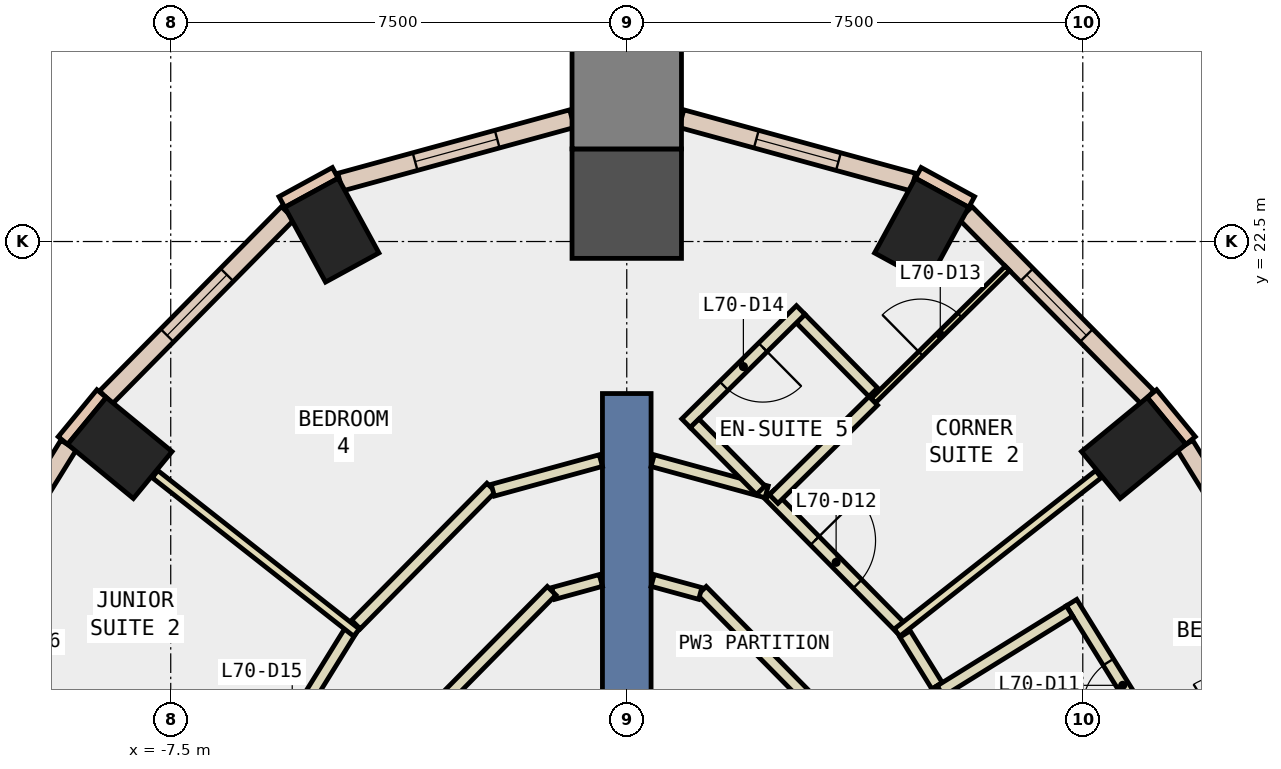
"""IFC4 building model, lengths in metres.
Left out: names, types, materials, properties, quantities, classifications, styles, units other than length and angle.
Written with IfcOpenShell. Run it as: python <this file> out.ifc"""

import sys

from ifc_helpers import new_model, si_unit, direction, frame, frame_2d, origin, origin_2d, place, context, subcontext, project, spatial, rectangle, extrude, element, fill, save


model = new_model("IFC4")
c1 = context("Model", 3, precision=1e-05, world=origin(), true_north=direction((0.0, 1.0)))
c2 = subcontext(c1, "Body", "Model", "MODEL_VIEW")
j1 = project(units=[si_unit("LENGTHUNIT", "METRE"), si_unit("PLANEANGLEUNIT", "RADIAN")], contexts=[c1])
p1 = place(None, origin())
s1 = spatial("IfcSite", under=j1, at=p1, CompositionType="ELEMENT")
p2 = place(p1, origin())
s2 = spatial("IfcBuilding", under=s1, at=p2, CompositionType="ELEMENT")
p3 = place(p2, frame((0.0, 0.0, 300.8)))
s3 = spatial("IfcBuildingStorey", under=s2, at=p3, CompositionType="ELEMENT", Elevation=300.8)
for number, where, z_axis, x_axis in (
    (1, (8.337, 19.105, -0.34), (0.0, 0.0, 1.0), (-0.636, 0.772, 0.0)),
    (2, (4.85, 22.687, -0.34), (0.0, 0.0, 1.0), (-0.878, 0.479, 0.0)),
):
    element("IfcColumn", number, at=place(p3, frame(where, z_axis=z_axis, x_axis=x_axis)), inside=s3, PredefinedType="COLUMN", context=c2, shape_type="SweptSolid", body=[
        extrude(rectangle(XDim=1.0, YDim=1.4, at=origin_2d()), origin(), (0.0, 0.0, 1.0), 3.6),
    ])
p4 = place(p3, frame((0.0, 23.123, -0.34), z_axis=(0.0, 0.0, 1.0), x_axis=(0.0, 1.0, 0.0)))
e3 = element("IfcColumn", 3, at=p4, inside=s3, PredefinedType="COLUMN", context=c2, shape_type="SweptSolid", body=[
    extrude(rectangle(XDim=1.8, YDim=1.8, at=origin_2d()), origin(), (0.0, 0.0, 1.0), 3.6),
])
for number, where, z_axis, x_axis in (
    (4, (-4.85, 22.687, -0.34), (0.0, 0.0, 1.0), (0.878, 0.479, 0.0)),
    (5, (-8.337, 19.105, -0.34), (0.0, 0.0, 1.0), (0.636, 0.772, 0.0)),
):
    element("IfcColumn", number, at=place(p3, frame(where, z_axis=z_axis, x_axis=x_axis)), inside=s3, PredefinedType="COLUMN", context=c2, shape_type="SweptSolid", body=[
        extrude(rectangle(XDim=1.0, YDim=1.4, at=origin_2d()), origin(), (0.0, 0.0, 1.0), 3.6),
    ])
p5 = place(p3, frame((0.0, 24.923, -0.34), z_axis=(0.0, 0.0, 1.0), x_axis=(0.0, 1.0, 0.0)))
e6 = element("IfcColumn", 6, at=p5, inside=s3, PredefinedType="COLUMN", context=c2, shape_type="SweptSolid", body=[
    extrude(rectangle(XDim=1.8, YDim=1.8, at=origin_2d()), origin(), (0.0, 0.0, 1.0), 3.6),
])
p6 = place(p3, frame((0.0, 11.0, -0.34), z_axis=(0.0, 0.0, 1.0), x_axis=(0.0, 1.0, 0.0)))
e7 = element("IfcWall", 7, at=p6, inside=s3, PredefinedType="SHEAR", context=c2, shape_type="SweptSolid", body=[
    extrude(rectangle(XDim=9.0, YDim=0.8, at=frame_2d((4.5, 0.0))), origin(), (0.0, 0.0, 1.0), 3.6),
])
for number, where, z_axis, x_axis in (
    (8, (5.672, 23.15, 0.0), (0.0, 0.0, 1.0), (-0.878, 0.479, 0.0)),
    (9, (-4.794, 23.629, 0.0), (0.0, 0.0, 1.0), (-0.878, -0.479, 0.0)),
    (10, (9.273, 19.227, 0.0), (0.0, 0.0, 1.0), (-0.636, 0.772, 0.0)),
    (11, (-8.637, 19.999, 0.0), (0.0, 0.0, 1.0), (-0.636, -0.772, 0.0)),
):
    element("IfcWall", number, at=place(p3, frame(where, z_axis=z_axis, x_axis=x_axis)), inside=s3, PredefinedType="STANDARD", context=c2, shape_type="SweptSolid", body=[
        extrude(rectangle(XDim=1.0, YDim=0.2, at=frame_2d((0.5, 0.0))), origin(), (0.0, 0.0, 1.0), 3.26),
    ])
p7 = place(p3, frame((13.047, 12.907, 0.0), z_axis=(0.0, 0.0, 1.0), x_axis=(-0.526409529565, 0.850231149267, 0.0)))
e12 = element("IfcWall", 12, at=p7, inside=s3, PredefinedType="STANDARD", context=c2, shape_type="SweptSolid", body=[
    extrude(rectangle(XDim=7.346, YDim=0.3, at=frame_2d((3.673, 0.0))), origin(), (0.0, 0.0, 1.0), 3.26),
])
p8 = place(p7, frame((0.737, 0.0, 0.9)))
e13 = element("IfcOpeningElement", 13, at=p8, cuts=e12, PredefinedType="OPENING", context=c2, shape_type="SweptSolid", body=[
    extrude(rectangle(XDim=2.2, YDim=2.0, at=frame_2d((1.1, 1.0))), frame((0.0, 0.16, 0.0), z_axis=(0.0, -1.0, 0.0), x_axis=(1.0, 0.0, 0.0)), (0.0, 0.0, 1.0), 0.32),
])
p9 = place(p7, frame((4.41, 0.0, 0.9)))
e14 = element("IfcOpeningElement", 14, at=p9, cuts=e12, PredefinedType="OPENING", context=c2, shape_type="SweptSolid", body=[
    extrude(rectangle(XDim=2.2, YDim=2.0, at=frame_2d((1.1, 1.0))), frame((0.0, 0.16, 0.0), z_axis=(0.0, -1.0, 0.0), x_axis=(1.0, 0.0, 0.0)), (0.0, 0.0, 1.0), 0.32),
])
p10 = place(p3, frame((8.564, 19.938, 0.0), z_axis=(0.0, 0.0, 1.0), x_axis=(-0.70250598769, 0.711677832491, 0.0)))
e15 = element("IfcWall", 15, at=p10, inside=s3, PredefinedType="STANDARD", context=c2, shape_type="SweptSolid", body=[
    extrude(rectangle(XDim=4.259, YDim=0.3, at=frame_2d((2.129, 0.0))), origin(), (0.0, 0.0, 1.0), 3.26),
])
p11 = place(p10, frame((1.429, 0.0, 0.9)))
e16 = element("IfcOpeningElement", 16, at=p11, cuts=e15, PredefinedType="OPENING", context=c2, shape_type="SweptSolid", body=[
    extrude(rectangle(XDim=1.4, YDim=2.0, at=frame_2d((0.7, 1.0))), frame((0.0, 0.16, 0.0), z_axis=(0.0, -1.0, 0.0), x_axis=(1.0, 0.0, 0.0)), (0.0, 0.0, 1.0), 0.32),
])
p12 = place(p3, frame((4.713, 23.477, 0.0), z_axis=(0.0, 0.0, 1.0), x_axis=(-0.964521196932, 0.264005417877, 0.0)))
e17 = element("IfcWall", 17, at=p12, inside=s3, PredefinedType="STANDARD", context=c2, shape_type="SweptSolid", body=[
    extrude(rectangle(XDim=3.954, YDim=0.3, at=frame_2d((1.977, 0.0))), origin(), (0.0, 0.0, 1.0), 3.26),
])
p13 = place(p12, frame((1.277, 0.0, 0.9)))
e18 = element("IfcOpeningElement", 18, at=p13, cuts=e17, PredefinedType="OPENING", context=c2, shape_type="SweptSolid", body=[
    extrude(rectangle(XDim=1.4, YDim=2.0, at=frame_2d((0.7, 1.0))), frame((0.0, 0.16, 0.0), z_axis=(0.0, -1.0, 0.0), x_axis=(1.0, 0.0, 0.0)), (0.0, 0.0, 1.0), 0.32),
])
p14 = place(p3, frame((-0.899, 24.521, 0.0), z_axis=(0.0, 0.0, 1.0), x_axis=(-0.964521196932, -0.264005417877, 0.0)))
e19 = element("IfcWall", 19, at=p14, inside=s3, PredefinedType="STANDARD", context=c2, shape_type="SweptSolid", body=[
    extrude(rectangle(XDim=3.954, YDim=0.3, at=frame_2d((1.977, 0.0))), origin(), (0.0, 0.0, 1.0), 3.26),
])
p15 = place(p14, frame((1.277, 0.0, 0.9)))
e20 = element("IfcOpeningElement", 20, at=p15, cuts=e19, PredefinedType="OPENING", context=c2, shape_type="SweptSolid", body=[
    extrude(rectangle(XDim=1.4, YDim=2.0, at=frame_2d((0.7, 1.0))), frame((0.0, 0.16, 0.0), z_axis=(0.0, -1.0, 0.0), x_axis=(1.0, 0.0, 0.0)), (0.0, 0.0, 1.0), 0.32),
])
p16 = place(p3, frame((-5.572, 22.969, 0.0), z_axis=(0.0, 0.0, 1.0), x_axis=(-0.70250598769, -0.711677832491, 0.0)))
e21 = element("IfcWall", 21, at=p16, inside=s3, PredefinedType="STANDARD", context=c2, shape_type="SweptSolid", body=[
    extrude(rectangle(XDim=4.259, YDim=0.3, at=frame_2d((2.129, 0.0))), origin(), (0.0, 0.0, 1.0), 3.26),
])
p17 = place(p16, frame((1.429, 0.0, 0.9)))
e22 = element("IfcOpeningElement", 22, at=p17, cuts=e21, PredefinedType="OPENING", context=c2, shape_type="SweptSolid", body=[
    extrude(rectangle(XDim=1.4, YDim=2.0, at=frame_2d((0.7, 1.0))), frame((0.0, 0.16, 0.0), z_axis=(0.0, -1.0, 0.0), x_axis=(1.0, 0.0, 0.0)), (0.0, 0.0, 1.0), 0.32),
])
p18 = place(p3, frame((-9.18, 19.153, 0.0), z_axis=(0.0, 0.0, 1.0), x_axis=(-0.526409529565, -0.850231149267, 0.0)))
e23 = element("IfcWall", 23, at=p18, inside=s3, PredefinedType="STANDARD", context=c2, shape_type="SweptSolid", body=[
    extrude(rectangle(XDim=7.346, YDim=0.3, at=frame_2d((3.673, 0.0))), origin(), (0.0, 0.0, 1.0), 3.26),
])
p19 = place(p18, frame((0.737, 0.0, 0.9)))
e24 = element("IfcOpeningElement", 24, at=p19, cuts=e23, PredefinedType="OPENING", context=c2, shape_type="SweptSolid", body=[
    extrude(rectangle(XDim=2.2, YDim=2.0, at=frame_2d((1.1, 1.0))), frame((0.0, 0.16, 0.0), z_axis=(0.0, -1.0, 0.0), x_axis=(1.0, 0.0, 0.0)), (0.0, 0.0, 1.0), 0.32),
])
p20 = place(p18, frame((4.41, 0.0, 0.9)))
e25 = element("IfcOpeningElement", 25, at=p20, cuts=e23, PredefinedType="OPENING", context=c2, shape_type="SweptSolid", body=[
    extrude(rectangle(XDim=2.2, YDim=2.0, at=frame_2d((1.1, 1.0))), frame((0.0, 0.16, 0.0), z_axis=(0.0, -1.0, 0.0), x_axis=(1.0, 0.0, 0.0)), (0.0, 0.0, 1.0), 0.32),
])
p21 = place(p3, frame((2.951, 15.019, 0.0), z_axis=(0.0, 0.0, 1.0), x_axis=(-0.702341227034, 0.711840432126, 0.0)))
e26 = element("IfcWall", 26, at=p21, inside=s3, PredefinedType="PARTITIONING", context=c2, shape_type="SweptSolid", body=[
    extrude(rectangle(XDim=2.442, YDim=0.2, at=frame_2d((1.221, 0.0))), origin(), (0.0, 0.0, 1.0), 3.26),
])
p22 = place(p3, frame((1.209, 16.712, 0.0), z_axis=(0.0, 0.0, 1.0), x_axis=(-0.964583129746, 0.26377904733, 0.0)))
e27 = element("IfcWall", 27, at=p22, inside=s3, PredefinedType="PARTITIONING", context=c2, shape_type="SweptSolid", body=[
    extrude(rectangle(XDim=0.812, YDim=0.2, at=frame_2d((0.406, 0.0))), origin(), (0.0, 0.0, 1.0), 3.26),
])
p23 = place(p3, frame((-0.426, 16.927, 0.0), z_axis=(0.0, 0.0, 1.0), x_axis=(-0.964276465753, -0.264897900321, 0.0)))
e28 = element("IfcWall", 28, at=p23, inside=s3, PredefinedType="PARTITIONING", context=c2, shape_type="SweptSolid", body=[
    extrude(rectangle(XDim=0.812, YDim=0.2, at=frame_2d((0.406, 0.0))), origin(), (0.0, 0.0, 1.0), 3.26),
])
p24 = place(p3, frame((-1.236, 16.757, 0.0), z_axis=(0.0, 0.0, 1.0), x_axis=(-0.702341227034, -0.711840432126, 0.0)))
e29 = element("IfcWall", 29, at=p24, inside=s3, PredefinedType="PARTITIONING", context=c2, shape_type="SweptSolid", body=[
    extrude(rectangle(XDim=2.442, YDim=0.2, at=frame_2d((1.221, 0.0))), origin(), (0.0, 0.0, 1.0), 3.26),
])
p25 = place(p3, frame((4.577, 16.045, 0.0), z_axis=(0.0, 0.0, 1.0), x_axis=(0.526203576349, -0.850358628014, 0.0)))
e30 = element("IfcWall", 30, at=p25, inside=s3, PredefinedType="PARTITIONING", context=c2, shape_type="SweptSolid", body=[
    extrude(rectangle(XDim=1.002, YDim=0.2, at=frame_2d((0.501, 0.0))), origin(), (0.0, 0.0, 1.0), 3.26),
])
p26 = place(p3, frame((5.104, 15.193, 0.0), z_axis=(0.0, 0.0, 1.0), x_axis=(0.526329401671, -0.850280754184, 0.0)))
e31 = element("IfcWall", 31, at=p26, inside=s3, PredefinedType="PARTITIONING", context=c2, shape_type="SweptSolid", body=[
    extrude(rectangle(XDim=3.0, YDim=0.2, at=frame_2d((1.5, 0.0))), origin(), (0.0, 0.0, 1.0), 3.26),
])
p27 = place(p3, frame((2.346, 18.336, 0.0), z_axis=(0.0, 0.0, 1.0), x_axis=(0.702481985573, -0.711701524479, 0.0)))
e32 = element("IfcWall", 32, at=p27, inside=s3, PredefinedType="PARTITIONING", context=c2, shape_type="SweptSolid", body=[
    extrude(rectangle(XDim=3.125, YDim=0.2, at=frame_2d((1.562, 0.0))), origin(), (0.0, 0.0, 1.0), 3.26),
])
p28 = place(p27, frame((1.062, 0.0, 0.0)))
e33 = element("IfcOpeningElement", 33, at=p28, cuts=e32, PredefinedType="OPENING", context=c2, shape_type="SweptSolid", body=[
    extrude(rectangle(XDim=1.0, YDim=2.1, at=frame_2d((0.5, 1.05))), frame((0.0, 0.11, 0.0), z_axis=(0.0, -1.0, 0.0), x_axis=(1.0, 0.0, 0.0)), (0.0, 0.0, 1.0), 0.22),
])
p29 = place(p3, frame((-4.454, 16.201, 0.0), z_axis=(0.0, 0.0, 1.0), x_axis=(0.702505657511, 0.711678158415, 0.0)))
e34 = element("IfcWall", 34, at=p29, inside=s3, PredefinedType="PARTITIONING", context=c2, shape_type="SweptSolid", body=[
    extrude(rectangle(XDim=3.167, YDim=0.2, at=frame_2d((1.584, 0.0))), origin(), (0.0, 0.0, 1.0), 3.26),
])
p30 = place(p3, frame((-2.203, 18.41, 0.0), z_axis=(0.0, 0.0, 1.0), x_axis=(0.964423583418, 0.264361781934, 0.0)))
e35 = element("IfcWall", 35, at=p30, inside=s3, PredefinedType="PARTITIONING", context=c2, shape_type="SweptSolid", body=[
    extrude(rectangle(XDim=1.842, YDim=0.2, at=frame_2d((0.921, 0.0))), origin(), (0.0, 0.0, 1.0), 3.26),
])
p31 = place(p3, frame((0.426, 18.896, 0.0), z_axis=(0.0, 0.0, 1.0), x_axis=(0.964522741234, -0.263999775838, 0.0)))
e36 = element("IfcWall", 36, at=p31, inside=s3, PredefinedType="PARTITIONING", context=c2, shape_type="SweptSolid", body=[
    extrude(rectangle(XDim=1.943, YDim=0.2, at=frame_2d((0.971, 0.0))), origin(), (0.0, 0.0, 1.0), 3.26),
])
p32 = place(p3, frame((-6.493, 12.95, 0.0), z_axis=(0.0, 0.0, 1.0), x_axis=(0.526432748426, 0.850216773173, 0.0)))
e37 = element("IfcWall", 37, at=p32, inside=s3, PredefinedType="PARTITIONING", context=c2, shape_type="SweptSolid", body=[
    extrude(rectangle(XDim=3.765, YDim=0.2, at=frame_2d((1.882, 0.0))), origin(), (0.0, 0.0, 1.0), 3.26),
])
p33 = place(p32, frame((1.383, 0.0, 0.0)))
e38 = element("IfcOpeningElement", 38, at=p33, cuts=e37, PredefinedType="OPENING", context=c2, shape_type="SweptSolid", body=[
    extrude(rectangle(XDim=1.0, YDim=2.1, at=frame_2d((0.5, 1.05))), frame((0.0, 0.11, 0.0), z_axis=(0.0, -1.0, 0.0), x_axis=(1.0, 0.0, 0.0)), (0.0, 0.0, 1.0), 0.22),
])
p34 = place(p3, frame((9.031, 13.979, 0.0), z_axis=(0.0, 0.0, 1.0), x_axis=(0.85032680557, 0.526254998768, 0.0)))
e39 = element("IfcWall", 39, at=p34, inside=s3, PredefinedType="PARTITIONING", context=c2, shape_type="SweptSolid", body=[
    extrude(rectangle(XDim=2.7, YDim=0.1, at=frame_2d((1.35, 0.0))), origin(), (0.0, 0.0, 1.0), 3.26),
])
p35 = place(p34, frame((0.9, 0.0, 0.0)))
e40 = element("IfcOpeningElement", 40, at=p35, cuts=e39, PredefinedType="OPENING", context=c2, shape_type="SweptSolid", body=[
    extrude(rectangle(XDim=0.9, YDim=2.1, at=frame_2d((0.45, 1.05))), frame((0.0, 0.06, 0.0), z_axis=(0.0, -1.0, 0.0), x_axis=(1.0, 0.0, 0.0)), (0.0, 0.0, 1.0), 0.12),
])
p36 = place(p3, frame((8.999, 13.841, 0.0), z_axis=(0.0, 0.0, 1.0), x_axis=(-0.526283695852, 0.850309044689, 0.0)))
e41 = element("IfcWall", 41, at=p36, inside=s3, PredefinedType="PARTITIONING", context=c2, shape_type="SweptSolid", body=[
    extrude(rectangle(XDim=3.2, YDim=0.2, at=frame_2d((1.6, 0.0))), origin(), (0.0, 0.0, 1.0), 3.26),
])
p37 = place(p36, frame((1.15, 0.0, 0.0)))
e42 = element("IfcOpeningElement", 42, at=p37, cuts=e41, PredefinedType="OPENING", context=c2, shape_type="SweptSolid", body=[
    extrude(rectangle(XDim=0.9, YDim=2.1, at=frame_2d((0.45, 1.05))), frame((0.0, 0.11, 0.0), z_axis=(0.0, -1.0, 0.0), x_axis=(1.0, 0.0, 0.0)), (0.0, 0.0, 1.0), 0.22),
])
p38 = place(p3, frame((7.282, 16.424, 0.0), z_axis=(0.0, 0.0, 1.0), x_axis=(-0.850142312258, -0.526552987751, 0.0)))
e43 = element("IfcWall", 43, at=p38, inside=s3, PredefinedType="PARTITIONING", context=c2, shape_type="SweptSolid", body=[
    extrude(rectangle(XDim=2.5, YDim=0.2, at=frame_2d((1.25, 0.0))), origin(), (0.0, 0.0, 1.0), 3.26),
])
p39 = place(p3, frame((4.445, 16.068, 0.0), z_axis=(0.0, 0.0, 1.0), x_axis=(0.785872006963, 0.618389188677, 0.0)))
e44 = element("IfcWall", 44, at=p39, inside=s3, PredefinedType="PARTITIONING", context=c2, shape_type="SweptSolid", body=[
    extrude(rectangle(XDim=4.216, YDim=0.15, at=frame_2d((2.108, 0.0))), origin(), (0.0, 0.0, 1.0), 3.26),
])
p40 = place(p3, frame((4.053, 19.881, 0.0), z_axis=(0.0, 0.0, 1.0), x_axis=(0.711776071152, 0.702406452516, 0.0)))
e45 = element("IfcWall", 45, at=p40, inside=s3, PredefinedType="PARTITIONING", context=c2, shape_type="SweptSolid", body=[
    extrude(rectangle(XDim=3.101, YDim=0.1, at=frame_2d((1.55, 0.0))), origin(), (0.0, 0.0, 1.0), 3.26),
])
p41 = place(p40, frame((1.1, 0.0, 0.0)))
e46 = element("IfcOpeningElement", 46, at=p41, cuts=e45, PredefinedType="OPENING", context=c2, shape_type="SweptSolid", body=[
    extrude(rectangle(XDim=0.9, YDim=2.1, at=frame_2d((0.45, 1.05))), frame((0.0, 0.06, 0.0), z_axis=(0.0, -1.0, 0.0), x_axis=(1.0, 0.0, 0.0)), (0.0, 0.0, 1.0), 0.12),
])
p42 = place(p3, frame((2.416, 18.265, 0.0), z_axis=(0.0, 0.0, 1.0), x_axis=(0.71207765541, 0.702100714047, 0.0)))
e47 = element("IfcWall", 47, at=p42, inside=s3, PredefinedType="PARTITIONING", context=c2, shape_type="SweptSolid", body=[
    extrude(rectangle(XDim=2.3, YDim=0.2, at=frame_2d((1.15, 0.0))), origin(), (0.0, 0.0, 1.0), 3.26),
])
p43 = place(p3, frame((4.054, 20.022, 0.0), z_axis=(0.0, 0.0, 1.0), x_axis=(-0.702351102688, 0.711830688123, 0.0)))
e48 = element("IfcWall", 48, at=p43, inside=s3, PredefinedType="PARTITIONING", context=c2, shape_type="SweptSolid", body=[
    extrude(rectangle(XDim=1.7, YDim=0.2, at=frame_2d((0.85, 0.0))), origin(), (0.0, 0.0, 1.0), 3.26),
])
p44 = place(p3, frame((2.861, 21.374, 0.0), z_axis=(0.0, 0.0, 1.0), x_axis=(-0.711606122075, -0.702578626934, 0.0)))
e49 = element("IfcWall", 49, at=p44, inside=s3, PredefinedType="PARTITIONING", context=c2, shape_type="SweptSolid", body=[
    extrude(rectangle(XDim=2.65, YDim=0.2, at=frame_2d((1.325, 0.0))), origin(), (0.0, 0.0, 1.0), 3.26),
])
p45 = place(p44, frame((0.875, 0.0, 0.0)))
e50 = element("IfcOpeningElement", 50, at=p45, cuts=e49, PredefinedType="OPENING", context=c2, shape_type="SweptSolid", body=[
    extrude(rectangle(XDim=0.9, YDim=2.1, at=frame_2d((0.45, 1.05))), frame((0.0, 0.11, 0.0), z_axis=(0.0, -1.0, 0.0), x_axis=(1.0, 0.0, 0.0)), (0.0, 0.0, 1.0), 0.22),
])
p46 = place(p3, frame((1.116, 19.511, 0.0), z_axis=(0.0, 0.0, 1.0), x_axis=(0.702515837086, -0.711668109896, 0.0)))
e51 = element("IfcWall", 51, at=p46, inside=s3, PredefinedType="PARTITIONING", context=c2, shape_type="SweptSolid", body=[
    extrude(rectangle(XDim=1.547, YDim=0.2, at=frame_2d((0.773, 0.0))), origin(), (0.0, 0.0, 1.0), 3.26),
])
p47 = place(p3, frame((-4.445, 16.068, 0.0), z_axis=(0.0, 0.0, 1.0), x_axis=(-0.785872006963, 0.618389188677, 0.0)))
e52 = element("IfcWall", 52, at=p47, inside=s3, PredefinedType="PARTITIONING", context=c2, shape_type="SweptSolid", body=[
    extrude(rectangle(XDim=4.216, YDim=0.15, at=frame_2d((2.108, 0.0))), origin(), (0.0, 0.0, 1.0), 3.26),
])
p48 = place(p3, frame((-8.906, 14.562, 0.0), z_axis=(0.0, 0.0, 1.0), x_axis=(-0.850186034224, 0.526482390219, 0.0)))
e53 = element("IfcWall", 53, at=p48, inside=s3, PredefinedType="PARTITIONING", context=c2, shape_type="SweptSolid", body=[
    extrude(rectangle(XDim=2.5, YDim=0.1, at=frame_2d((1.25, 0.0))), origin(), (0.0, 0.0, 1.0), 3.26),
])
p49 = place(p48, frame((0.8, 0.0, 0.0)))
e54 = element("IfcOpeningElement", 54, at=p49, cuts=e53, PredefinedType="OPENING", context=c2, shape_type="SweptSolid", body=[
    extrude(rectangle(XDim=0.9, YDim=2.1, at=frame_2d((0.45, 1.05))), frame((0.0, 0.06, 0.0), z_axis=(0.0, -1.0, 0.0), x_axis=(1.0, 0.0, 0.0)), (0.0, 0.0, 1.0), 0.12),
])
p50 = place(p11, origin())
e55 = element("IfcWindow", 55, at=p50, inside=s3, PartitioningType="SINGLE_PANEL", PredefinedType="WINDOW", context=c2, shape_type="SweptSolid", body=[
    extrude(rectangle(XDim=1.4, YDim=2.0, at=frame_2d((0.7, 1.0))), frame((0.0, 0.03, 0.0), z_axis=(0.0, -1.0, 0.0), x_axis=(1.0, 0.0, 0.0)), (0.0, 0.0, 1.0), 0.06),
])
fill(e16, e55)
p51 = place(p13, origin())
e56 = element("IfcWindow", 56, at=p51, inside=s3, PartitioningType="SINGLE_PANEL", PredefinedType="WINDOW", context=c2, shape_type="SweptSolid", body=[
    extrude(rectangle(XDim=1.4, YDim=2.0, at=frame_2d((0.7, 1.0))), frame((0.0, 0.03, 0.0), z_axis=(0.0, -1.0, 0.0), x_axis=(1.0, 0.0, 0.0)), (0.0, 0.0, 1.0), 0.06),
])
fill(e18, e56)
p52 = place(p15, origin())
e57 = element("IfcWindow", 57, at=p52, inside=s3, PartitioningType="SINGLE_PANEL", PredefinedType="WINDOW", context=c2, shape_type="SweptSolid", body=[
    extrude(rectangle(XDim=1.4, YDim=2.0, at=frame_2d((0.7, 1.0))), frame((0.0, 0.03, 0.0), z_axis=(0.0, -1.0, 0.0), x_axis=(1.0, 0.0, 0.0)), (0.0, 0.0, 1.0), 0.06),
])
fill(e20, e57)
p53 = place(p17, origin())
e58 = element("IfcWindow", 58, at=p53, inside=s3, PartitioningType="SINGLE_PANEL", PredefinedType="WINDOW", context=c2, shape_type="SweptSolid", body=[
    extrude(rectangle(XDim=1.4, YDim=2.0, at=frame_2d((0.7, 1.0))), frame((0.0, 0.03, 0.0), z_axis=(0.0, -1.0, 0.0), x_axis=(1.0, 0.0, 0.0)), (0.0, 0.0, 1.0), 0.06),
])
fill(e22, e58)
p54 = place(p37, origin())
e59 = element("IfcDoor", 59, at=p54, inside=s3, OperationType="SINGLE_SWING_RIGHT", PredefinedType="DOOR", context=c2, shape_type="SweptSolid", body=[
    extrude(rectangle(XDim=0.9, YDim=2.1, at=frame_2d((0.45, 1.05))), frame((0.0, 0.025, 0.0), z_axis=(0.0, -1.0, 0.0), x_axis=(1.0, 0.0, 0.0)), (0.0, 0.0, 1.0), 0.05),
])
fill(e42, e59)
p55 = place(p28, origin())
e60 = element("IfcDoor", 60, at=p55, inside=s3, OperationType="SINGLE_SWING_LEFT", PredefinedType="DOOR", context=c2, shape_type="SweptSolid", body=[
    extrude(rectangle(XDim=1.0, YDim=2.1, at=frame_2d((0.5, 1.05))), frame((0.0, 0.025, 0.0), z_axis=(0.0, -1.0, 0.0), x_axis=(1.0, 0.0, 0.0)), (0.0, 0.0, 1.0), 0.05),
])
fill(e33, e60)
p56 = place(p41, origin())
e61 = element("IfcDoor", 61, at=p56, inside=s3, OperationType="SINGLE_SWING_LEFT", PredefinedType="DOOR", context=c2, shape_type="SweptSolid", body=[
    extrude(rectangle(XDim=0.9, YDim=2.1, at=frame_2d((0.45, 1.05))), frame((0.0, 0.025, 0.0), z_axis=(0.0, -1.0, 0.0), x_axis=(1.0, 0.0, 0.0)), (0.0, 0.0, 1.0), 0.05),
])
fill(e46, e61)
p57 = place(p45, origin())
e62 = element("IfcDoor", 62, at=p57, inside=s3, OperationType="SINGLE_SWING_LEFT", PredefinedType="DOOR", context=c2, shape_type="SweptSolid", body=[
    extrude(rectangle(XDim=0.9, YDim=2.1, at=frame_2d((0.45, 1.05))), frame((0.0, 0.025, 0.0), z_axis=(0.0, -1.0, 0.0), x_axis=(1.0, 0.0, 0.0)), (0.0, 0.0, 1.0), 0.05),
])
fill(e50, e62)
save(model, sys.argv[1])
